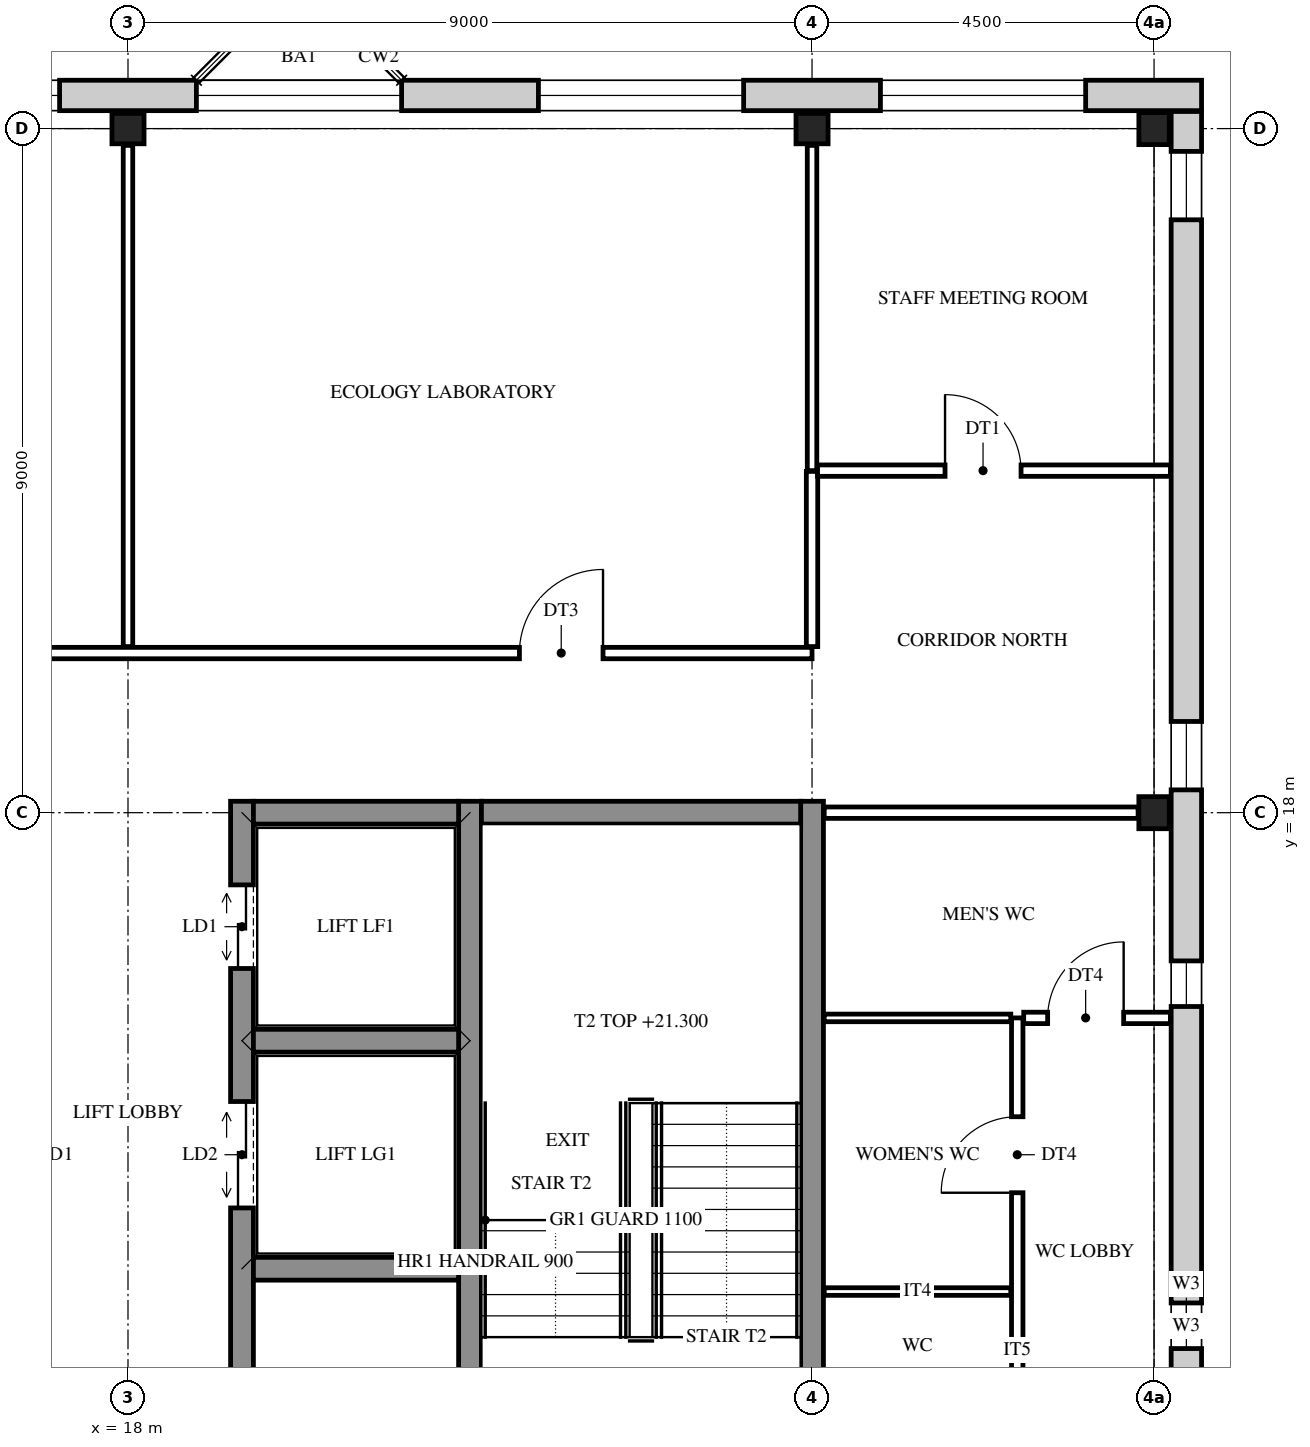
"""IFC4 building model, lengths in metres.
Left out: names, types, materials, properties, quantities, classifications, styles, units other than length and angle.
Written with IfcOpenShell. Run it as: python <this file> out.ifc"""

import sys

from ifc_helpers import new_model, si_unit, direction, frame, frame_2d, origin, origin_2d, place, context, subcontext, project, spatial, rectangle, i_section, extrude, element, fill, save


model = new_model("IFC4")
c1 = context("Model", 3, precision=1e-05, world=origin(), true_north=direction((0.0, 1.0)))
c2 = subcontext(c1, "Body", "Model", "MODEL_VIEW")
j1 = project(units=[si_unit("LENGTHUNIT", "METRE"), si_unit("PLANEANGLEUNIT", "RADIAN")], contexts=[c1])
p1 = place(None, origin())
s1 = spatial("IfcSite", under=j1, at=p1, CompositionType="ELEMENT")
p2 = place(p1, origin())
s2 = spatial("IfcBuilding", under=s1, at=p2, CompositionType="ELEMENT")
p3 = place(p2, frame((0.0, 0.0, 19.2)))
s3 = spatial("IfcBuildingStorey", under=s2, at=p3, CompositionType="ELEMENT", Elevation=19.2)
for number, where, z_axis, x_axis in (
    (1, (18.0, 27.0, 0.0), (0.0, 0.0, 1.0), (0.0, 1.0, 0.0)),
    (2, (27.0, 27.0, 0.0), (0.0, 0.0, 1.0), (0.0, 1.0, 0.0)),
    (3, (31.5, 18.0, 0.0), (0.0, 0.0, 1.0), (1.0, 0.0, 0.0)),
    (4, (31.5, 27.0, 0.0), (0.0, 0.0, 1.0), (1.0, 0.0, 0.0)),
):
    element("IfcColumn", number, at=place(p3, frame(where, z_axis=z_axis, x_axis=x_axis)), inside=s3, PredefinedType="COLUMN", context=c2, shape_type="SweptSolid", body=[
        extrude(i_section(OverallWidth=0.4, OverallDepth=0.422, WebThickness=0.028, FlangeThickness=0.036, at=origin_2d()), origin(), (0.0, 0.0, 1.0), 4.2),
    ])
p4 = place(p3, frame((19.5, 8.85, 0.0), z_axis=(0.0, 0.0, 1.0), x_axis=(0.0, 1.0, 0.0)))
e5 = element("IfcWall", 5, at=p4, inside=s3, PredefinedType="SHEAR", context=c2, shape_type="SweptSolid", body=[
    extrude(rectangle(XDim=9.3, YDim=0.3, at=frame_2d((4.65, 0.0))), origin(), (0.0, 0.0, 1.0), 4.2),
])
p5 = place(p4, frame((3.95, 0.0, 0.0)))
e6 = element("IfcOpeningElement", 6, at=p5, cuts=e5, PredefinedType="OPENING", context=c2, shape_type="SweptSolid", body=[
    extrude(rectangle(XDim=1.4, YDim=2.1, at=frame_2d((0.7, 1.05))), frame((0.0, 0.16, 0.0), z_axis=(0.0, -1.0, 0.0), x_axis=(1.0, 0.0, 0.0)), (0.0, 0.0, 1.0), 0.32),
])
p6 = place(p4, frame((7.1, 0.0, 0.0)))
e7 = element("IfcOpeningElement", 7, at=p6, cuts=e5, PredefinedType="OPENING", context=c2, shape_type="SweptSolid", body=[
    extrude(rectangle(XDim=1.1, YDim=2.1, at=frame_2d((0.55, 1.05))), frame((0.0, 0.16, 0.0), z_axis=(0.0, -1.0, 0.0), x_axis=(1.0, 0.0, 0.0)), (0.0, 0.0, 1.0), 0.32),
])
for number, where, z_axis, x_axis in (
    (8, (22.5, 8.85, 0.0), (0.0, 0.0, 1.0), (0.0, 1.0, 0.0)),
    (9, (27.0, 8.85, 0.0), (0.0, 0.0, 1.0), (0.0, 1.0, 0.0)),
):
    element("IfcWall", number, at=place(p3, frame(where, z_axis=z_axis, x_axis=x_axis)), inside=s3, PredefinedType="SHEAR", context=c2, shape_type="SweptSolid", body=[
        extrude(rectangle(XDim=9.3, YDim=0.3, at=frame_2d((4.65, 0.0))), origin(), (0.0, 0.0, 1.0), 4.2),
    ])
for number, where, z_axis, x_axis in (
    (10, (19.65, 12.0, 0.0), (0.0, 0.0, 1.0), (1.0, 0.0, 0.0)),
    (11, (19.65, 15.0, 0.0), (0.0, 0.0, 1.0), (1.0, 0.0, 0.0)),
    (12, (19.65, 18.0, 0.0), (0.0, 0.0, 1.0), (1.0, 0.0, 0.0)),
):
    element("IfcWall", number, at=place(p3, frame(where, z_axis=z_axis, x_axis=x_axis)), inside=s3, PredefinedType="SHEAR", context=c2, shape_type="SweptSolid", body=[
        extrude(rectangle(XDim=2.7, YDim=0.3, at=frame_2d((1.35, 0.0))), origin(), (0.0, 0.0, 1.0), 4.2),
    ])
p7 = place(p3, frame((22.65, 18.0, 0.0), z_axis=(0.0, 0.0, 1.0), x_axis=(1.0, 0.0, 0.0)))
e13 = element("IfcWall", 13, at=p7, inside=s3, PredefinedType="SHEAR", context=c2, shape_type="SweptSolid", body=[
    extrude(rectangle(XDim=4.2, YDim=0.3, at=frame_2d((2.1, 0.0))), origin(), (0.0, 0.0, 1.0), 4.2),
])
p8 = place(p3, frame((-0.625, 27.436, 0.0), z_axis=(0.0, 0.0, 1.0), x_axis=(1.0, 0.0, 0.0)))
e14 = element("IfcWall", 14, at=p8, inside=s3, PredefinedType="STANDARD", context=c2, shape_type="SweptSolid", body=[
    extrude(rectangle(XDim=32.75, YDim=0.4, at=frame_2d((16.375, 0.0))), origin(), (0.0, 0.0, 1.0), 4.2),
])
p9 = place(p8, frame((1.525, 0.0, 0.9)))
e15 = element("IfcOpeningElement", 15, at=p9, cuts=e14, PredefinedType="OPENING", context=c2, shape_type="SweptSolid", body=[
    extrude(rectangle(XDim=2.7, YDim=2.5, at=frame_2d((1.35, 1.25))), frame((0.0, 0.21, 0.0), z_axis=(0.0, -1.0, 0.0), x_axis=(1.0, 0.0, 0.0)), (0.0, 0.0, 1.0), 0.42),
])
p10 = place(p8, frame((6.025, 0.0, 0.9)))
e16 = element("IfcOpeningElement", 16, at=p10, cuts=e14, PredefinedType="OPENING", context=c2, shape_type="SweptSolid", body=[
    extrude(rectangle(XDim=2.7, YDim=2.5, at=frame_2d((1.35, 1.25))), frame((0.0, 0.21, 0.0), z_axis=(0.0, -1.0, 0.0), x_axis=(1.0, 0.0, 0.0)), (0.0, 0.0, 1.0), 0.42),
])
p11 = place(p8, frame((10.525, 0.0, 0.9)))
e17 = element("IfcOpeningElement", 17, at=p11, cuts=e14, PredefinedType="OPENING", context=c2, shape_type="SweptSolid", body=[
    extrude(rectangle(XDim=2.7, YDim=2.5, at=frame_2d((1.35, 1.25))), frame((0.0, 0.21, 0.0), z_axis=(0.0, -1.0, 0.0), x_axis=(1.0, 0.0, 0.0)), (0.0, 0.0, 1.0), 0.42),
])
p12 = place(p8, frame((15.025, 0.0, 0.9)))
e18 = element("IfcOpeningElement", 18, at=p12, cuts=e14, PredefinedType="OPENING", context=c2, shape_type="SweptSolid", body=[
    extrude(rectangle(XDim=2.7, YDim=2.5, at=frame_2d((1.35, 1.25))), frame((0.0, 0.21, 0.0), z_axis=(0.0, -1.0, 0.0), x_axis=(1.0, 0.0, 0.0)), (0.0, 0.0, 1.0), 0.42),
])
p13 = place(p8, frame((19.525, 0.0, 0.9)))
e19 = element("IfcOpeningElement", 19, at=p13, cuts=e14, PredefinedType="OPENING", context=c2, shape_type="SweptSolid", body=[
    extrude(rectangle(XDim=2.7, YDim=2.5, at=frame_2d((1.35, 1.25))), frame((0.0, 0.21, 0.0), z_axis=(0.0, -1.0, 0.0), x_axis=(1.0, 0.0, 0.0)), (0.0, 0.0, 1.0), 0.42),
])
p14 = place(p8, frame((24.025, 0.0, 0.9)))
e20 = element("IfcOpeningElement", 20, at=p14, cuts=e14, PredefinedType="OPENING", context=c2, shape_type="SweptSolid", body=[
    extrude(rectangle(XDim=2.7, YDim=2.5, at=frame_2d((1.35, 1.25))), frame((0.0, 0.21, 0.0), z_axis=(0.0, -1.0, 0.0), x_axis=(1.0, 0.0, 0.0)), (0.0, 0.0, 1.0), 0.42),
])
p15 = place(p8, frame((28.525, 0.0, 0.9)))
e21 = element("IfcOpeningElement", 21, at=p15, cuts=e14, PredefinedType="OPENING", context=c2, shape_type="SweptSolid", body=[
    extrude(rectangle(XDim=2.7, YDim=2.5, at=frame_2d((1.35, 1.25))), frame((0.0, 0.21, 0.0), z_axis=(0.0, -1.0, 0.0), x_axis=(1.0, 0.0, 0.0)), (0.0, 0.0, 1.0), 0.42),
])
p16 = place(p3, frame((31.925, 27.225, 0.0), z_axis=(0.0, 0.0, 1.0), x_axis=(0.0, -1.0, 0.0)))
e22 = element("IfcWall", 22, at=p16, inside=s3, PredefinedType="STANDARD", context=c2, shape_type="SweptSolid", body=[
    extrude(rectangle(XDim=27.45, YDim=0.4, at=frame_2d((13.725, 0.0))), origin(), (0.0, 0.0, 1.0), 4.2),
])
p17 = place(p16, frame((26.025, 0.0, 0.9)))
e23 = element("IfcOpeningElement", 23, at=p17, cuts=e22, PredefinedType="OPENING", context=c2, shape_type="SweptSolid", body=[
    extrude(rectangle(XDim=0.9, YDim=2.0, at=frame_2d((0.45, 1.0))), frame((0.0, 0.21, 0.0), z_axis=(0.0, -1.0, 0.0), x_axis=(1.0, 0.0, 0.0)), (0.0, 0.0, 1.0), 0.42),
])
p18 = place(p16, frame((18.525, 0.0, 0.9)))
e24 = element("IfcOpeningElement", 24, at=p18, cuts=e22, PredefinedType="OPENING", context=c2, shape_type="SweptSolid", body=[
    extrude(rectangle(XDim=0.9, YDim=2.0, at=frame_2d((0.45, 1.0))), frame((0.0, 0.21, 0.0), z_axis=(0.0, -1.0, 0.0), x_axis=(1.0, 0.0, 0.0)), (0.0, 0.0, 1.0), 0.42),
])
p19 = place(p16, frame((15.675, 0.0, 1.6)))
e25 = element("IfcOpeningElement", 25, at=p19, cuts=e22, PredefinedType="OPENING", context=c2, shape_type="SweptSolid", body=[
    extrude(rectangle(XDim=0.6, YDim=0.9, at=frame_2d((0.3, 0.45))), frame((0.0, 0.21, 0.0), z_axis=(0.0, -1.0, 0.0), x_axis=(1.0, 0.0, 0.0)), (0.0, 0.0, 1.0), 0.42),
])
p20 = place(p16, frame((11.175, 0.0, 1.6)))
e26 = element("IfcOpeningElement", 26, at=p20, cuts=e22, PredefinedType="OPENING", context=c2, shape_type="SweptSolid", body=[
    extrude(rectangle(XDim=0.6, YDim=0.9, at=frame_2d((0.3, 0.45))), frame((0.0, 0.21, 0.0), z_axis=(0.0, -1.0, 0.0), x_axis=(1.0, 0.0, 0.0)), (0.0, 0.0, 1.0), 0.42),
])
p21 = place(p16, frame((8.025, 0.0, 0.9)))
e27 = element("IfcOpeningElement", 27, at=p21, cuts=e22, PredefinedType="OPENING", context=c2, shape_type="SweptSolid", body=[
    extrude(rectangle(XDim=0.9, YDim=2.0, at=frame_2d((0.45, 1.0))), frame((0.0, 0.21, 0.0), z_axis=(0.0, -1.0, 0.0), x_axis=(1.0, 0.0, 0.0)), (0.0, 0.0, 1.0), 0.42),
])
p22 = place(p16, frame((0.525, 0.0, 0.9)))
e28 = element("IfcOpeningElement", 28, at=p22, cuts=e22, PredefinedType="OPENING", context=c2, shape_type="SweptSolid", body=[
    extrude(rectangle(XDim=0.9, YDim=2.0, at=frame_2d((0.45, 1.0))), frame((0.0, 0.21, 0.0), z_axis=(0.0, -1.0, 0.0), x_axis=(1.0, 0.0, 0.0)), (0.0, 0.0, 1.0), 0.42),
])
p23 = place(p3, frame((18.0, 20.185, 0.0), z_axis=(0.0, 0.0, 1.0), x_axis=(0.0, 1.0, 0.0)))
e29 = element("IfcWall", 29, at=p23, inside=s3, PredefinedType="PARTITIONING", context=c2, shape_type="SweptSolid", body=[
    extrude(rectangle(XDim=6.594, YDim=0.125, at=frame_2d((3.297, 0.0))), origin(), (0.0, 0.0, 1.0), 3.537),
])
p24 = place(p3, frame((27.0, 20.185, 0.0), z_axis=(0.0, 0.0, 1.0), x_axis=(0.0, 1.0, 0.0)))
e30 = element("IfcWall", 30, at=p24, inside=s3, PredefinedType="PARTITIONING", context=c2, shape_type="SweptSolid", body=[
    extrude(rectangle(XDim=2.305, YDim=0.15, at=frame_2d((1.152, 0.0))), origin(), (0.0, 0.0, 1.0), 3.537),
])
p25 = place(p3, frame((27.0, 22.5, 0.0), z_axis=(0.0, 0.0, 1.0), x_axis=(0.0, 1.0, 0.0)))
e31 = element("IfcWall", 31, at=p25, inside=s3, PredefinedType="PARTITIONING", context=c2, shape_type="SweptSolid", body=[
    extrude(rectangle(XDim=4.279, YDim=0.125, at=frame_2d((2.14, 0.0))), origin(), (0.0, 0.0, 1.0), 3.537),
])
p26 = place(p3, frame((29.7, 9.0, 0.0), z_axis=(0.0, 0.0, 1.0), x_axis=(0.0, 1.0, 0.0)))
e32 = element("IfcWall", 32, at=p26, inside=s3, PredefinedType="PARTITIONING", context=c2, shape_type="SweptSolid", body=[
    extrude(rectangle(XDim=6.3, YDim=0.15, at=frame_2d((3.15, 0.0))), origin(), (0.0, 0.0, 1.0), 3.537),
])
p27 = place(p26, frame((4.0, 0.0, 0.0)))
e33 = element("IfcOpeningElement", 33, at=p27, cuts=e32, PredefinedType="OPENING", context=c2, shape_type="SweptSolid", body=[
    extrude(rectangle(XDim=1.0, YDim=2.1, at=frame_2d((0.5, 1.05))), frame((0.0, 0.085, 0.0), z_axis=(0.0, -1.0, 0.0), x_axis=(1.0, 0.0, 0.0)), (0.0, 0.0, 1.0), 0.17),
])
for number, where, z_axis, x_axis in (
    (34, (27.16, 11.7, 0.0), (0.0, 0.0, 1.0), (1.0, 0.0, 0.0)),
    (35, (27.16, 15.3, 0.0), (0.0, 0.0, 1.0), (1.0, 0.0, 0.0)),
):
    element("IfcWall", number, at=place(p3, frame(where, z_axis=z_axis, x_axis=x_axis)), inside=s3, PredefinedType="PARTITIONING", context=c2, shape_type="SweptSolid", body=[
        extrude(rectangle(XDim=2.455, YDim=0.1, at=frame_2d((1.228, 0.0))), origin(), (0.0, 0.0, 1.0), 3.537),
    ])
p28 = place(p3, frame((29.785, 15.3, 0.0), z_axis=(0.0, 0.0, 1.0), x_axis=(1.0, 0.0, 0.0)))
e36 = element("IfcWall", 36, at=p28, inside=s3, PredefinedType="PARTITIONING", context=c2, shape_type="SweptSolid", body=[
    extrude(rectangle(XDim=1.93, YDim=0.15, at=frame_2d((0.965, 0.0))), origin(), (0.0, 0.0, 1.0), 3.537),
])
p29 = place(p28, frame((0.315, 0.0, 0.0)))
e37 = element("IfcOpeningElement", 37, at=p29, cuts=e36, PredefinedType="OPENING", context=c2, shape_type="SweptSolid", body=[
    extrude(rectangle(XDim=1.0, YDim=2.1, at=frame_2d((0.5, 1.05))), frame((0.0, 0.085, 0.0), z_axis=(0.0, -1.0, 0.0), x_axis=(1.0, 0.0, 0.0)), (0.0, 0.0, 1.0), 0.17),
])
p30 = place(p3, frame((27.16, 18.0, 0.0), z_axis=(0.0, 0.0, 1.0), x_axis=(1.0, 0.0, 0.0)))
e38 = element("IfcWall", 38, at=p30, inside=s3, PredefinedType="PARTITIONING", context=c2, shape_type="SweptSolid", body=[
    extrude(rectangle(XDim=4.13, YDim=0.15, at=frame_2d((2.065, 0.0))), origin(), (0.0, 0.0, 1.0), 3.537),
])
p31 = place(p3, frame((6.9, 20.1, 0.0), z_axis=(0.0, 0.0, 1.0), x_axis=(1.0, 0.0, 0.0)))
e39 = element("IfcWall", 39, at=p31, inside=s3, PredefinedType="PARTITIONING", context=c2, shape_type="SweptSolid", body=[
    extrude(rectangle(XDim=20.1, YDim=0.15, at=frame_2d((10.05, 0.0))), origin(), (0.0, 0.0, 1.0), 3.537),
])
p32 = place(p31, frame((0.15, 0.0, 0.0)))
e40 = element("IfcOpeningElement", 40, at=p32, cuts=e39, PredefinedType="OPENING", context=c2, shape_type="SweptSolid", body=[
    extrude(rectangle(XDim=1.1, YDim=2.1, at=frame_2d((0.55, 1.05))), frame((0.0, 0.085, 0.0), z_axis=(0.0, -1.0, 0.0), x_axis=(1.0, 0.0, 0.0)), (0.0, 0.0, 1.0), 0.17),
])
p33 = place(p31, frame((6.05, 0.0, 0.0)))
e41 = element("IfcOpeningElement", 41, at=p33, cuts=e39, PredefinedType="OPENING", context=c2, shape_type="SweptSolid", body=[
    extrude(rectangle(XDim=1.1, YDim=2.1, at=frame_2d((0.55, 1.05))), frame((0.0, 0.085, 0.0), z_axis=(0.0, -1.0, 0.0), x_axis=(1.0, 0.0, 0.0)), (0.0, 0.0, 1.0), 0.17),
])
p34 = place(p31, frame((16.25, 0.0, 0.0)))
e42 = element("IfcOpeningElement", 42, at=p34, cuts=e39, PredefinedType="OPENING", context=c2, shape_type="SweptSolid", body=[
    extrude(rectangle(XDim=1.1, YDim=2.1, at=frame_2d((0.55, 1.05))), frame((0.0, 0.085, 0.0), z_axis=(0.0, -1.0, 0.0), x_axis=(1.0, 0.0, 0.0)), (0.0, 0.0, 1.0), 0.17),
])
p35 = place(p3, frame((27.073, 22.5, 0.0), z_axis=(0.0, 0.0, 1.0), x_axis=(1.0, 0.0, 0.0)))
e43 = element("IfcWall", 43, at=p35, inside=s3, PredefinedType="PARTITIONING", context=c2, shape_type="SweptSolid", body=[
    extrude(rectangle(XDim=4.643, YDim=0.15, at=frame_2d((2.321, 0.0))), origin(), (0.0, 0.0, 1.0), 3.537),
])
p36 = place(p35, frame((1.677, 0.0, 0.0)))
e44 = element("IfcOpeningElement", 44, at=p36, cuts=e43, PredefinedType="OPENING", context=c2, shape_type="SweptSolid", body=[
    extrude(rectangle(XDim=1.0, YDim=2.1, at=frame_2d((0.5, 1.05))), frame((0.0, 0.085, 0.0), z_axis=(0.0, -1.0, 0.0), x_axis=(1.0, 0.0, 0.0)), (0.0, 0.0, 1.0), 0.17),
])
p37 = place(p12, origin())
e45 = element("IfcWindow", 45, at=p37, inside=s3, PartitioningType="SINGLE_PANEL", PredefinedType="WINDOW", context=c2, shape_type="SweptSolid", body=[
    extrude(rectangle(XDim=2.7, YDim=2.5, at=frame_2d((1.35, 1.25))), frame((0.0, 0.03, 0.0), z_axis=(0.0, -1.0, 0.0), x_axis=(1.0, 0.0, 0.0)), (0.0, 0.0, 1.0), 0.06),
])
fill(e18, e45)
p38 = place(p13, origin())
e46 = element("IfcWindow", 46, at=p38, inside=s3, PartitioningType="SINGLE_PANEL", PredefinedType="WINDOW", context=c2, shape_type="SweptSolid", body=[
    extrude(rectangle(XDim=2.7, YDim=2.5, at=frame_2d((1.35, 1.25))), frame((0.0, 0.03, 0.0), z_axis=(0.0, -1.0, 0.0), x_axis=(1.0, 0.0, 0.0)), (0.0, 0.0, 1.0), 0.06),
])
fill(e19, e46)
p39 = place(p14, origin())
e47 = element("IfcWindow", 47, at=p39, inside=s3, PartitioningType="SINGLE_PANEL", PredefinedType="WINDOW", context=c2, shape_type="SweptSolid", body=[
    extrude(rectangle(XDim=2.7, YDim=2.5, at=frame_2d((1.35, 1.25))), frame((0.0, 0.03, 0.0), z_axis=(0.0, -1.0, 0.0), x_axis=(1.0, 0.0, 0.0)), (0.0, 0.0, 1.0), 0.06),
])
fill(e20, e47)
p40 = place(p15, origin())
e48 = element("IfcWindow", 48, at=p40, inside=s3, PartitioningType="SINGLE_PANEL", PredefinedType="WINDOW", context=c2, shape_type="SweptSolid", body=[
    extrude(rectangle(XDim=2.7, YDim=2.5, at=frame_2d((1.35, 1.25))), frame((0.0, 0.03, 0.0), z_axis=(0.0, -1.0, 0.0), x_axis=(1.0, 0.0, 0.0)), (0.0, 0.0, 1.0), 0.06),
])
fill(e21, e48)
p41 = place(p19, origin())
e49 = element("IfcWindow", 49, at=p41, inside=s3, PartitioningType="SINGLE_PANEL", PredefinedType="WINDOW", context=c2, shape_type="SweptSolid", body=[
    extrude(rectangle(XDim=0.6, YDim=0.9, at=frame_2d((0.3, 0.45))), frame((0.0, 0.03, 0.0), z_axis=(0.0, -1.0, 0.0), x_axis=(1.0, 0.0, 0.0)), (0.0, 0.0, 1.0), 0.06),
])
fill(e25, e49)
p42 = place(p20, origin())
e50 = element("IfcWindow", 50, at=p42, inside=s3, PartitioningType="SINGLE_PANEL", PredefinedType="WINDOW", context=c2, shape_type="SweptSolid", body=[
    extrude(rectangle(XDim=0.6, YDim=0.9, at=frame_2d((0.3, 0.45))), frame((0.0, 0.03, 0.0), z_axis=(0.0, -1.0, 0.0), x_axis=(1.0, 0.0, 0.0)), (0.0, 0.0, 1.0), 0.06),
])
fill(e26, e50)
p43 = place(p21, origin())
e51 = element("IfcWindow", 51, at=p43, inside=s3, PartitioningType="SINGLE_PANEL", PredefinedType="WINDOW", context=c2, shape_type="SweptSolid", body=[
    extrude(rectangle(XDim=0.9, YDim=2.0, at=frame_2d((0.45, 1.0))), frame((0.0, 0.03, 0.0), z_axis=(0.0, -1.0, 0.0), x_axis=(1.0, 0.0, 0.0)), (0.0, 0.0, 1.0), 0.06),
])
fill(e27, e51)
p44 = place(p22, origin())
e52 = element("IfcWindow", 52, at=p44, inside=s3, PartitioningType="SINGLE_PANEL", PredefinedType="WINDOW", context=c2, shape_type="SweptSolid", body=[
    extrude(rectangle(XDim=0.9, YDim=2.0, at=frame_2d((0.45, 1.0))), frame((0.0, 0.03, 0.0), z_axis=(0.0, -1.0, 0.0), x_axis=(1.0, 0.0, 0.0)), (0.0, 0.0, 1.0), 0.06),
])
fill(e28, e52)
p45 = place(p27, origin())
e53 = element("IfcDoor", 53, at=p45, inside=s3, OperationType="SINGLE_SWING_LEFT", PredefinedType="DOOR", context=c2, shape_type="SweptSolid", body=[
    extrude(rectangle(XDim=1.0, YDim=2.1, at=frame_2d((0.5, 1.05))), frame((0.0, 0.025, 0.0), z_axis=(0.0, -1.0, 0.0), x_axis=(1.0, 0.0, 0.0)), (0.0, 0.0, 1.0), 0.05),
])
fill(e33, e53)
p46 = place(p29, origin())
e54 = element("IfcDoor", 54, at=p46, inside=s3, OperationType="SINGLE_SWING_RIGHT", PredefinedType="DOOR", context=c2, shape_type="SweptSolid", body=[
    extrude(rectangle(XDim=1.0, YDim=2.1, at=frame_2d((0.5, 1.05))), frame((0.0, 0.025, 0.0), z_axis=(0.0, -1.0, 0.0), x_axis=(1.0, 0.0, 0.0)), (0.0, 0.0, 1.0), 0.05),
])
fill(e37, e54)
p47 = place(p34, origin())
e55 = element("IfcDoor", 55, at=p47, inside=s3, OperationType="SINGLE_SWING_RIGHT", PredefinedType="DOOR", context=c2, shape_type="SweptSolid", body=[
    extrude(rectangle(XDim=1.1, YDim=2.1, at=frame_2d((0.55, 1.05))), frame((0.0, 0.025, 0.0), z_axis=(0.0, -1.0, 0.0), x_axis=(1.0, 0.0, 0.0)), (0.0, 0.0, 1.0), 0.05),
])
fill(e42, e55)
p48 = place(p36, origin())
e56 = element("IfcDoor", 56, at=p48, inside=s3, OperationType="SINGLE_SWING_LEFT", PredefinedType="DOOR", context=c2, shape_type="SweptSolid", body=[
    extrude(rectangle(XDim=1.0, YDim=2.1, at=frame_2d((0.5, 1.05))), frame((0.0, 0.025, 0.0), z_axis=(0.0, -1.0, 0.0), x_axis=(1.0, 0.0, 0.0)), (0.0, 0.0, 1.0), 0.05),
])
fill(e44, e56)
p49 = place(p5, origin())
e57 = element("IfcDoor", 57, at=p49, inside=s3, OperationType="DOUBLE_DOOR_SLIDING", PredefinedType="DOOR", context=c2, shape_type="SweptSolid", body=[
    extrude(rectangle(XDim=1.4, YDim=2.1, at=frame_2d((0.7, 1.05))), frame((0.0, 0.025, 0.0), z_axis=(0.0, -1.0, 0.0), x_axis=(1.0, 0.0, 0.0)), (0.0, 0.0, 1.0), 0.05),
])
fill(e6, e57)
p50 = place(p6, origin())
e58 = element("IfcDoor", 58, at=p50, inside=s3, OperationType="DOUBLE_DOOR_SLIDING", PredefinedType="DOOR", context=c2, shape_type="SweptSolid", body=[
    extrude(rectangle(XDim=1.1, YDim=2.1, at=frame_2d((0.55, 1.05))), frame((0.0, 0.025, 0.0), z_axis=(0.0, -1.0, 0.0), x_axis=(1.0, 0.0, 0.0)), (0.0, 0.0, 1.0), 0.05),
])
fill(e7, e58)
save(model, sys.argv[1])
